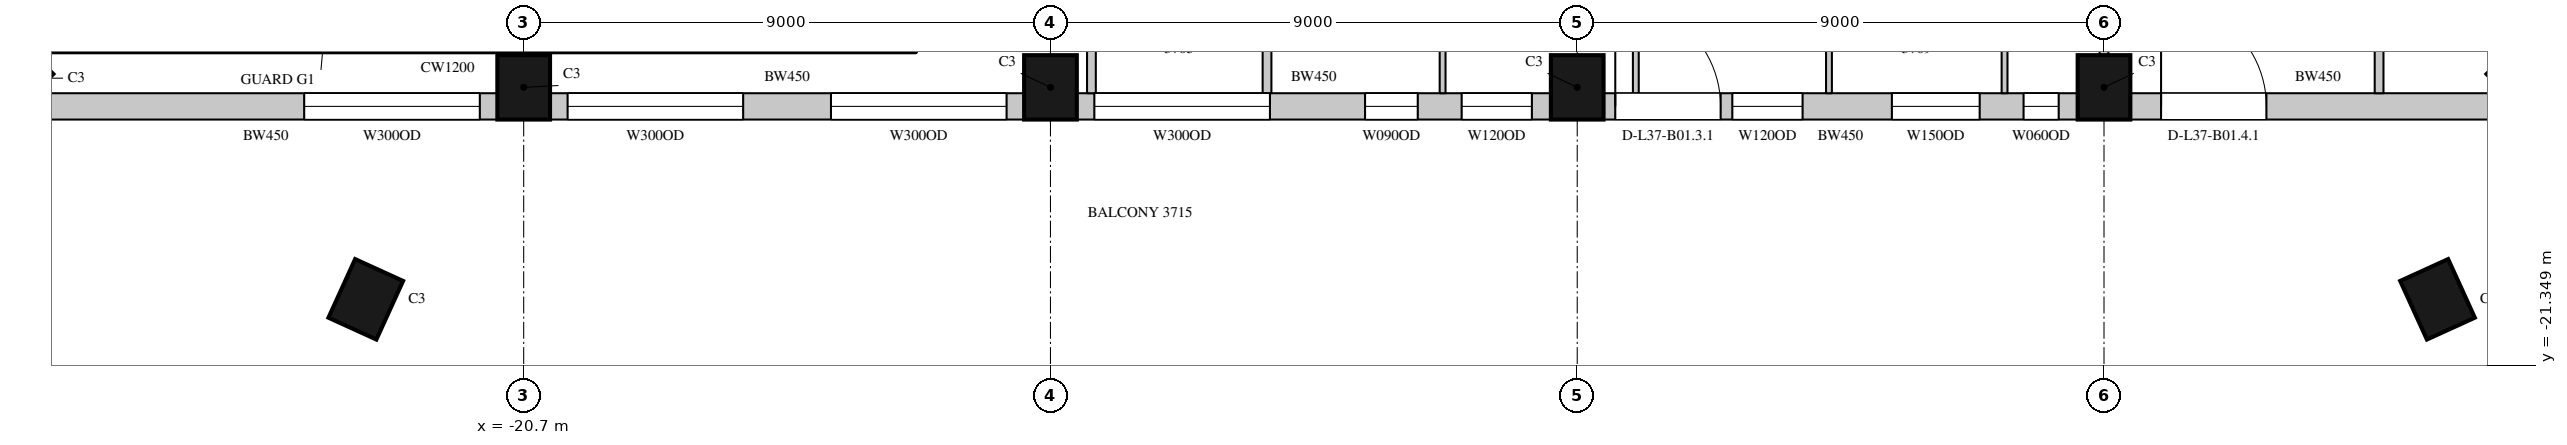
"""IFC4 building model, lengths in metres.
Left out: names, types, materials, properties, quantities, classifications, styles, units other than length and angle.
Written with IfcOpenShell. Run it as: python <this file> out.ifc"""

import sys

from ifc_helpers import new_model, si_unit, direction, frame, frame_2d, origin, origin_2d, place, context, subcontext, project, spatial, rectangle, extrude, element, fill, save


model = new_model("IFC4")
c1 = context("Model", 3, precision=1e-05, world=origin(), true_north=direction((0.0, 1.0)))
c2 = subcontext(c1, "Body", "Model", "MODEL_VIEW")
j1 = project(units=[si_unit("LENGTHUNIT", "METRE"), si_unit("PLANEANGLEUNIT", "RADIAN")], contexts=[c1])
p1 = place(None, origin())
s1 = spatial("IfcSite", under=j1, at=p1, CompositionType="ELEMENT")
p2 = place(p1, origin())
s2 = spatial("IfcBuilding", under=s1, at=p2, CompositionType="ELEMENT")
p3 = place(p2, frame((0.0, 0.0, 172.8)))
s3 = spatial("IfcBuildingStorey", under=s2, at=p3, CompositionType="ELEMENT", Elevation=172.8)
for number, where, z_axis, x_axis in (
    (1, (-29.443, -16.443, 0.0), (0.0, 0.0, 1.0), (0.707, -0.707, 0.0)),
    (2, (-20.7, -16.6, 0.0), (0.0, 0.0, 1.0), (1.0, 0.0, 0.0)),
    (3, (-11.7, -16.6, 0.0), (0.0, 0.0, 1.0), (1.0, 0.0, 0.0)),
    (4, (-2.7, -16.6, 0.0), (0.0, 0.0, 1.0), (1.0, 0.0, 0.0)),
    (5, (6.3, -16.6, 0.0), (0.0, 0.0, 1.0), (1.0, 0.0, 0.0)),
    (6, (13.543, -16.443, 0.0), (0.0, 0.0, 1.0), (0.707, 0.707, 0.0)),
    (7, (-23.398, -20.221, 0.0), (0.0, 0.0, 1.0), (0.91, -0.415, 0.0)),
    (8, (11.998, -20.221, 0.0), (0.0, 0.0, 1.0), (0.91, 0.415, 0.0)),
):
    element("IfcColumn", number, at=place(p3, frame(where, z_axis=z_axis, x_axis=x_axis)), inside=s3, PredefinedType="COLUMN", context=c2, shape_type="SweptSolid", body=[
        extrude(rectangle(XDim=0.9, YDim=1.1, at=origin_2d()), origin(), (0.0, 0.0, 1.0), 4.1),
    ])
p4 = place(p3, frame((-29.064, -16.925, 0.0), z_axis=(0.0, 0.0, 1.0), x_axis=(1.0, 0.0, 0.0)))
e9 = element("IfcWall", 9, at=p4, inside=s3, PredefinedType="SOLIDWALL", context=c2, shape_type="SweptSolid", body=[
    extrude(rectangle(XDim=7.914, YDim=0.45, at=frame_2d((3.957, 0.0))), origin(), (0.0, 0.0, 1.0), 3.8),
])
p5 = place(p4, frame((4.614, 0.0, 1.05)))
e10 = element("IfcOpeningElement", 10, at=p5, cuts=e9, PredefinedType="OPENING", context=c2, shape_type="SweptSolid", body=[
    extrude(rectangle(XDim=3.0, YDim=2.4, at=frame_2d((1.5, 1.2))), frame((0.0, 0.235, 0.0), z_axis=(0.0, -1.0, 0.0), x_axis=(1.0, 0.0, 0.0)), (0.0, 0.0, 1.0), 0.47),
])
p6 = place(p3, frame((-20.25, -16.925, 0.0), z_axis=(0.0, 0.0, 1.0), x_axis=(1.0, 0.0, 0.0)))
e11 = element("IfcWall", 11, at=p6, inside=s3, PredefinedType="SOLIDWALL", context=c2, shape_type="SweptSolid", body=[
    extrude(rectangle(XDim=8.1, YDim=0.45, at=frame_2d((4.05, 0.0))), origin(), (0.0, 0.0, 1.0), 3.8),
])
p7 = place(p6, frame((0.3, 0.0, 1.05)))
e12 = element("IfcOpeningElement", 12, at=p7, cuts=e11, PredefinedType="OPENING", context=c2, shape_type="SweptSolid", body=[
    extrude(rectangle(XDim=3.0, YDim=2.4, at=frame_2d((1.5, 1.2))), frame((0.0, 0.235, 0.0), z_axis=(0.0, -1.0, 0.0), x_axis=(1.0, 0.0, 0.0)), (0.0, 0.0, 1.0), 0.47),
])
p8 = place(p6, frame((4.8, 0.0, 1.05)))
e13 = element("IfcOpeningElement", 13, at=p8, cuts=e11, PredefinedType="OPENING", context=c2, shape_type="SweptSolid", body=[
    extrude(rectangle(XDim=3.0, YDim=2.4, at=frame_2d((1.5, 1.2))), frame((0.0, 0.235, 0.0), z_axis=(0.0, -1.0, 0.0), x_axis=(1.0, 0.0, 0.0)), (0.0, 0.0, 1.0), 0.47),
])
p9 = place(p3, frame((-11.25, -16.925, 0.0), z_axis=(0.0, 0.0, 1.0), x_axis=(1.0, 0.0, 0.0)))
e14 = element("IfcWall", 14, at=p9, inside=s3, PredefinedType="SOLIDWALL", context=c2, shape_type="SweptSolid", body=[
    extrude(rectangle(XDim=8.1, YDim=0.45, at=frame_2d((4.05, 0.0))), origin(), (0.0, 0.0, 1.0), 3.8),
])
p10 = place(p9, frame((0.3, 0.0, 1.05)))
e15 = element("IfcOpeningElement", 15, at=p10, cuts=e14, PredefinedType="OPENING", context=c2, shape_type="SweptSolid", body=[
    extrude(rectangle(XDim=3.0, YDim=2.4, at=frame_2d((1.5, 1.2))), frame((0.0, 0.235, 0.0), z_axis=(0.0, -1.0, 0.0), x_axis=(1.0, 0.0, 0.0)), (0.0, 0.0, 1.0), 0.47),
])
p11 = place(p9, frame((4.925, 0.0, 1.05)))
e16 = element("IfcOpeningElement", 16, at=p11, cuts=e14, PredefinedType="OPENING", context=c2, shape_type="SweptSolid", body=[
    extrude(rectangle(XDim=0.9, YDim=2.4, at=frame_2d((0.45, 1.2))), frame((0.0, 0.235, 0.0), z_axis=(0.0, -1.0, 0.0), x_axis=(1.0, 0.0, 0.0)), (0.0, 0.0, 1.0), 0.47),
])
p12 = place(p9, frame((6.575, 0.0, 1.05)))
e17 = element("IfcOpeningElement", 17, at=p12, cuts=e14, PredefinedType="OPENING", context=c2, shape_type="SweptSolid", body=[
    extrude(rectangle(XDim=1.2, YDim=2.4, at=frame_2d((0.6, 1.2))), frame((0.0, 0.235, 0.0), z_axis=(0.0, -1.0, 0.0), x_axis=(1.0, 0.0, 0.0)), (0.0, 0.0, 1.0), 0.47),
])
p13 = place(p3, frame((-2.25, -16.925, 0.0), z_axis=(0.0, 0.0, 1.0), x_axis=(1.0, 0.0, 0.0)))
e18 = element("IfcWall", 18, at=p13, inside=s3, PredefinedType="SOLIDWALL", context=c2, shape_type="SweptSolid", body=[
    extrude(rectangle(XDim=8.1, YDim=0.45, at=frame_2d((4.05, 0.0))), origin(), (0.0, 0.0, 1.0), 3.8),
])
p14 = place(p13, frame((0.2, 0.0, 0.0)))
e19 = element("IfcOpeningElement", 19, at=p14, cuts=e18, PredefinedType="OPENING", context=c2, shape_type="SweptSolid", body=[
    extrude(rectangle(XDim=1.8, YDim=2.4, at=frame_2d((0.9, 1.2))), frame((0.0, 0.235, 0.0), z_axis=(0.0, -1.0, 0.0), x_axis=(1.0, 0.0, 0.0)), (0.0, 0.0, 1.0), 0.47),
])
p15 = place(p13, frame((2.2, 0.0, 1.05)))
e20 = element("IfcOpeningElement", 20, at=p15, cuts=e18, PredefinedType="OPENING", context=c2, shape_type="SweptSolid", body=[
    extrude(rectangle(XDim=1.2, YDim=2.4, at=frame_2d((0.6, 1.2))), frame((0.0, 0.235, 0.0), z_axis=(0.0, -1.0, 0.0), x_axis=(1.0, 0.0, 0.0)), (0.0, 0.0, 1.0), 0.47),
])
p16 = place(p13, frame((4.926, 0.0, 1.05)))
e21 = element("IfcOpeningElement", 21, at=p16, cuts=e18, PredefinedType="OPENING", context=c2, shape_type="SweptSolid", body=[
    extrude(rectangle(XDim=1.5, YDim=2.4, at=frame_2d((0.75, 1.2))), frame((0.0, 0.235, 0.0), z_axis=(0.0, -1.0, 0.0), x_axis=(1.0, 0.0, 0.0)), (0.0, 0.0, 1.0), 0.47),
])
p17 = place(p13, frame((7.176, 0.0, 1.05)))
e22 = element("IfcOpeningElement", 22, at=p17, cuts=e18, PredefinedType="OPENING", context=c2, shape_type="SweptSolid", body=[
    extrude(rectangle(XDim=0.6, YDim=2.4, at=frame_2d((0.3, 1.2))), frame((0.0, 0.235, 0.0), z_axis=(0.0, -1.0, 0.0), x_axis=(1.0, 0.0, 0.0)), (0.0, 0.0, 1.0), 0.47),
])
p18 = place(p3, frame((6.75, -16.925, 0.0), z_axis=(0.0, 0.0, 1.0), x_axis=(1.0, 0.0, 0.0)))
e23 = element("IfcWall", 23, at=p18, inside=s3, PredefinedType="SOLIDWALL", context=c2, shape_type="SweptSolid", body=[
    extrude(rectangle(XDim=6.414, YDim=0.45, at=frame_2d((3.207, 0.0))), origin(), (0.0, 0.0, 1.0), 3.8),
])
p19 = place(p18, frame((0.525, 0.0, 0.0)))
e24 = element("IfcOpeningElement", 24, at=p19, cuts=e23, PredefinedType="OPENING", context=c2, shape_type="SweptSolid", body=[
    extrude(rectangle(XDim=1.8, YDim=2.4, at=frame_2d((0.9, 1.2))), frame((0.0, 0.235, 0.0), z_axis=(0.0, -1.0, 0.0), x_axis=(1.0, 0.0, 0.0)), (0.0, 0.0, 1.0), 0.47),
])
p20 = place(p3, frame((-26.95, -18.0, 0.0), z_axis=(0.0, 0.0, 1.0), x_axis=(1.0, 0.0, 0.0)))
e25 = element("IfcWall", 25, at=p20, inside=s3, PredefinedType="SOLIDWALL", context=c2, shape_type="SweptSolid", body=[
    extrude(rectangle(XDim=2.36, YDim=0.45, at=frame_2d((1.18, 0.0))), origin(), (0.0, 0.0, 1.0), 0.6),
])
for number, where, z_axis, x_axis in (
    (26, (-23.69, -18.0, 0.0), (0.0, 0.0, 1.0), (1.0, 0.0, 0.0)),
    (27, (-19.73, -18.0, 0.0), (0.0, 0.0, 1.0), (1.0, 0.0, 0.0)),
    (28, (-15.77, -18.0, 0.0), (0.0, 0.0, 1.0), (1.0, 0.0, 0.0)),
    (29, (-11.81, -18.0, 0.0), (0.0, 0.0, 1.0), (1.0, 0.0, 0.0)),
    (30, (-7.85, -18.0, 0.0), (0.0, 0.0, 1.0), (1.0, 0.0, 0.0)),
):
    element("IfcWall", number, at=place(p3, frame(where, z_axis=z_axis, x_axis=x_axis)), inside=s3, PredefinedType="SOLIDWALL", context=c2, shape_type="SweptSolid", body=[
        extrude(rectangle(XDim=3.76, YDim=0.45, at=frame_2d((1.88, 0.0))), origin(), (0.0, 0.0, 1.0), 0.6),
    ])
p21 = place(p3, frame((-3.89, -18.0, 0.0), z_axis=(0.0, 0.0, 1.0), x_axis=(1.0, 0.0, 0.0)))
e31 = element("IfcWall", 31, at=p21, inside=s3, PredefinedType="SOLIDWALL", context=c2, shape_type="SweptSolid", body=[
    extrude(rectangle(XDim=1.54, YDim=0.45, at=frame_2d((0.77, 0.0))), origin(), (0.0, 0.0, 1.0), 0.6),
])
p22 = place(p3, frame((0.07, -18.0, 0.0), z_axis=(0.0, 0.0, 1.0), x_axis=(1.0, 0.0, 0.0)))
e32 = element("IfcWall", 32, at=p22, inside=s3, PredefinedType="SOLIDWALL", context=c2, shape_type="SweptSolid", body=[
    extrude(rectangle(XDim=3.76, YDim=0.45, at=frame_2d((1.88, 0.0))), origin(), (0.0, 0.0, 1.0), 0.6),
])
p23 = place(p3, frame((4.03, -18.0, 0.0), z_axis=(0.0, 0.0, 1.0), x_axis=(1.0, 0.0, 0.0)))
e33 = element("IfcWall", 33, at=p23, inside=s3, PredefinedType="SOLIDWALL", context=c2, shape_type="SweptSolid", body=[
    extrude(rectangle(XDim=2.945, YDim=0.45, at=frame_2d((1.473, 0.0))), origin(), (0.0, 0.0, 1.0), 0.6),
])
p24 = place(p3, frame((-11.0, -16.7, 0.0), z_axis=(0.0, 0.0, 1.0), x_axis=(0.0, 1.0, 0.0)))
e34 = element("IfcWall", 34, at=p24, inside=s3, PredefinedType="PARTITIONING", context=c2, shape_type="SweptSolid", body=[
    extrude(rectangle(XDim=1.88, YDim=0.15, at=frame_2d((0.94, 0.0))), origin(), (0.0, 0.0, 1.0), 3.8),
])
p25 = place(p3, frame((-8.0, -16.7, 0.0), z_axis=(0.0, 0.0, 1.0), x_axis=(0.0, 1.0, 0.0)))
e35 = element("IfcWall", 35, at=p25, inside=s3, PredefinedType="PARTITIONING", context=c2, shape_type="SweptSolid", body=[
    extrude(rectangle(XDim=4.6, YDim=0.15, at=frame_2d((2.3, 0.0))), origin(), (0.0, 0.0, 1.0), 3.8),
])
p26 = place(p3, frame((6.3, -16.05, 0.0), z_axis=(0.0, 0.0, 1.0), x_axis=(0.0, 1.0, 0.0)))
e36 = element("IfcWall", 36, at=p26, inside=s3, PredefinedType="PARTITIONING", context=c2, shape_type="SweptSolid", body=[
    extrude(rectangle(XDim=3.95, YDim=0.15, at=frame_2d((1.975, 0.0))), origin(), (0.0, 0.0, 1.0), 3.25),
])
p27 = place(p3, frame((11.0, -16.7, 0.0), z_axis=(0.0, 0.0, 1.0), x_axis=(0.0, 1.0, 0.0)))
e37 = element("IfcWall", 37, at=p27, inside=s3, PredefinedType="PARTITIONING", context=c2, shape_type="SweptSolid", body=[
    extrude(rectangle(XDim=4.7, YDim=0.15, at=frame_2d((2.35, 0.0))), origin(), (0.0, 0.0, 1.0), 3.8),
])
for number, where, z_axis, x_axis in (
    (38, (-5.0, -16.7, 0.0), (0.0, 0.0, 1.0), (0.0, 1.0, 0.0)),
    (39, (-1.699, -16.7, 0.0), (0.0, 0.0, 1.0), (0.0, 1.0, 0.0)),
):
    element("IfcWall", number, at=place(p3, frame(where, z_axis=z_axis, x_axis=x_axis)), inside=s3, PredefinedType="PARTITIONING", context=c2, shape_type="SweptSolid", body=[
        extrude(rectangle(XDim=4.6, YDim=0.1, at=frame_2d((2.3, 0.0))), origin(), (0.0, 0.0, 1.0), 3.8),
    ])
p28 = place(p3, frame((1.601, -16.7, 0.0), z_axis=(0.0, 0.0, 1.0), x_axis=(0.0, 1.0, 0.0)))
e40 = element("IfcWall", 40, at=p28, inside=s3, PredefinedType="PARTITIONING", context=c2, shape_type="SweptSolid", body=[
    extrude(rectangle(XDim=4.6, YDim=0.1, at=frame_2d((2.3, 0.0))), origin(), (0.0, 0.0, 1.0), 3.15),
])
p29 = place(p3, frame((4.601, -16.7, 0.0), z_axis=(0.0, 0.0, 1.0), x_axis=(0.0, 1.0, 0.0)))
e41 = element("IfcWall", 41, at=p29, inside=s3, PredefinedType="PARTITIONING", context=c2, shape_type="SweptSolid", body=[
    extrude(rectangle(XDim=4.6, YDim=0.1, at=frame_2d((2.3, 0.0))), origin(), (0.0, 0.0, 1.0), 3.8),
])
p30 = place(p5, origin())
e42 = element("IfcWindow", 42, at=p30, inside=s3, PartitioningType="SINGLE_PANEL", PredefinedType="WINDOW", context=c2, shape_type="SweptSolid", body=[
    extrude(rectangle(XDim=3.0, YDim=2.4, at=frame_2d((1.5, 1.2))), frame((0.0, 0.135, 0.0), z_axis=(0.0, -1.0, 0.0), x_axis=(1.0, 0.0, 0.0)), (0.0, 0.0, 1.0), 0.06),
])
fill(e10, e42)
p31 = place(p7, origin())
e43 = element("IfcWindow", 43, at=p31, inside=s3, PartitioningType="SINGLE_PANEL", PredefinedType="WINDOW", context=c2, shape_type="SweptSolid", body=[
    extrude(rectangle(XDim=3.0, YDim=2.4, at=frame_2d((1.5, 1.2))), frame((0.0, 0.135, 0.0), z_axis=(0.0, -1.0, 0.0), x_axis=(1.0, 0.0, 0.0)), (0.0, 0.0, 1.0), 0.06),
])
fill(e12, e43)
p32 = place(p8, origin())
e44 = element("IfcWindow", 44, at=p32, inside=s3, PartitioningType="SINGLE_PANEL", PredefinedType="WINDOW", context=c2, shape_type="SweptSolid", body=[
    extrude(rectangle(XDim=3.0, YDim=2.4, at=frame_2d((1.5, 1.2))), frame((0.0, 0.135, 0.0), z_axis=(0.0, -1.0, 0.0), x_axis=(1.0, 0.0, 0.0)), (0.0, 0.0, 1.0), 0.06),
])
fill(e13, e44)
p33 = place(p10, origin())
e45 = element("IfcWindow", 45, at=p33, inside=s3, PartitioningType="SINGLE_PANEL", PredefinedType="WINDOW", context=c2, shape_type="SweptSolid", body=[
    extrude(rectangle(XDim=3.0, YDim=2.4, at=frame_2d((1.5, 1.2))), frame((0.0, 0.135, 0.0), z_axis=(0.0, -1.0, 0.0), x_axis=(1.0, 0.0, 0.0)), (0.0, 0.0, 1.0), 0.06),
])
fill(e15, e45)
p34 = place(p14, origin())
e46 = element("IfcDoor", 46, at=p34, inside=s3, OperationType="SLIDING_TO_LEFT", PredefinedType="DOOR", context=c2, shape_type="SweptSolid", body=[
    extrude(rectangle(XDim=1.8, YDim=2.4, at=frame_2d((0.9, 1.2))), frame((0.0, 0.13, 0.0), z_axis=(0.0, -1.0, 0.0), x_axis=(1.0, 0.0, 0.0)), (0.0, 0.0, 1.0), 0.05),
])
fill(e19, e46)
p35 = place(p15, origin())
e47 = element("IfcWindow", 47, at=p35, inside=s3, PartitioningType="SINGLE_PANEL", PredefinedType="WINDOW", context=c2, shape_type="SweptSolid", body=[
    extrude(rectangle(XDim=1.2, YDim=2.4, at=frame_2d((0.6, 1.2))), frame((0.0, 0.135, 0.0), z_axis=(0.0, -1.0, 0.0), x_axis=(1.0, 0.0, 0.0)), (0.0, 0.0, 1.0), 0.06),
])
fill(e20, e47)
p36 = place(p19, origin())
e48 = element("IfcDoor", 48, at=p36, inside=s3, OperationType="SLIDING_TO_LEFT", PredefinedType="DOOR", context=c2, shape_type="SweptSolid", body=[
    extrude(rectangle(XDim=1.8, YDim=2.4, at=frame_2d((0.9, 1.2))), frame((0.0, 0.13, 0.0), z_axis=(0.0, -1.0, 0.0), x_axis=(1.0, 0.0, 0.0)), (0.0, 0.0, 1.0), 0.05),
])
fill(e24, e48)
p37 = place(p11, origin())
e49 = element("IfcWindow", 49, at=p37, inside=s3, PartitioningType="SINGLE_PANEL", PredefinedType="WINDOW", context=c2, shape_type="SweptSolid", body=[
    extrude(rectangle(XDim=0.9, YDim=2.4, at=frame_2d((0.45, 1.2))), frame((0.0, 0.135, 0.0), z_axis=(0.0, -1.0, 0.0), x_axis=(1.0, 0.0, 0.0)), (0.0, 0.0, 1.0), 0.06),
])
fill(e16, e49)
p38 = place(p12, origin())
e50 = element("IfcWindow", 50, at=p38, inside=s3, PartitioningType="SINGLE_PANEL", PredefinedType="WINDOW", context=c2, shape_type="SweptSolid", body=[
    extrude(rectangle(XDim=1.2, YDim=2.4, at=frame_2d((0.6, 1.2))), frame((0.0, 0.135, 0.0), z_axis=(0.0, -1.0, 0.0), x_axis=(1.0, 0.0, 0.0)), (0.0, 0.0, 1.0), 0.06),
])
fill(e17, e50)
p39 = place(p16, origin())
e51 = element("IfcWindow", 51, at=p39, inside=s3, PartitioningType="SINGLE_PANEL", PredefinedType="WINDOW", context=c2, shape_type="SweptSolid", body=[
    extrude(rectangle(XDim=1.5, YDim=2.4, at=frame_2d((0.75, 1.2))), frame((0.0, 0.135, 0.0), z_axis=(0.0, -1.0, 0.0), x_axis=(1.0, 0.0, 0.0)), (0.0, 0.0, 1.0), 0.06),
])
fill(e21, e51)
p40 = place(p17, origin())
e52 = element("IfcWindow", 52, at=p40, inside=s3, PartitioningType="SINGLE_PANEL", PredefinedType="WINDOW", context=c2, shape_type="SweptSolid", body=[
    extrude(rectangle(XDim=0.6, YDim=2.4, at=frame_2d((0.3, 1.2))), frame((0.0, 0.135, 0.0), z_axis=(0.0, -1.0, 0.0), x_axis=(1.0, 0.0, 0.0)), (0.0, 0.0, 1.0), 0.06),
])
fill(e22, e52)
save(model, sys.argv[1])
